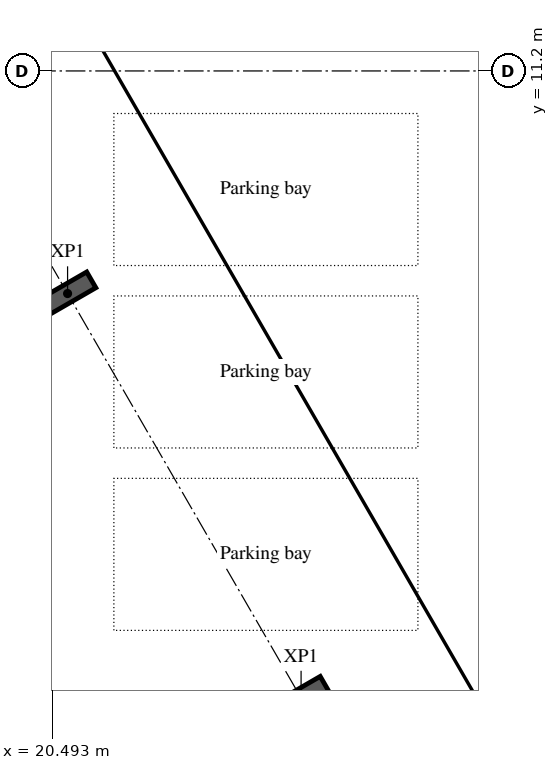
"""IFC4 building model, lengths in metres.
Left out: names, types, materials, properties, quantities, classifications, styles, units other than length and angle.
Written with IfcOpenShell. Run it as: python <this file> out.ifc"""

import sys

from ifc_helpers import new_model, si_unit, direction, frame, origin, origin_2d, place, context, subcontext, project, spatial, i_section, extrude, element, save


model = new_model("IFC4")
c1 = context("Model", 3, precision=1e-05, world=origin(), true_north=direction((0.0, 1.0)))
c2 = subcontext(c1, "Body", "Model", "MODEL_VIEW")
j1 = project(units=[si_unit("LENGTHUNIT", "METRE"), si_unit("PLANEANGLEUNIT", "RADIAN")], contexts=[c1])
p1 = place(None, origin())
s1 = spatial("IfcSite", under=j1, at=p1, CompositionType="ELEMENT")
p2 = place(p1, origin())
s2 = spatial("IfcBuilding", under=s1, at=p2, CompositionType="ELEMENT")
p3 = place(p2, frame((0.0, 0.0, -8.4)))
s3 = spatial("IfcBuildingStorey", under=s2, at=p3, CompositionType="ELEMENT", Elevation=-8.4)
for number, where, z_axis, x_axis in (
    (1, (24.579, 0.888, 0.0), (0.0, 0.0, 1.0), (0.5, -0.866, 0.0)),
    (2, (20.739, 7.539, 0.0), (0.0, 0.0, 1.0), (0.5, -0.866, 0.0)),
):
    element("IfcColumn", number, at=place(p3, frame(where, z_axis=z_axis, x_axis=x_axis)), inside=s3, PredefinedType="COLUMN", context=c2, shape_type="SweptSolid", body=[
        extrude(i_section(OverallWidth=0.3, OverallDepth=0.9, WebThickness=0.019, FlangeThickness=0.035, FilletRadius=0.03, at=origin_2d()), origin(), (0.0, 0.0, 1.0), 3.82),
    ])
save(model, sys.argv[1])
